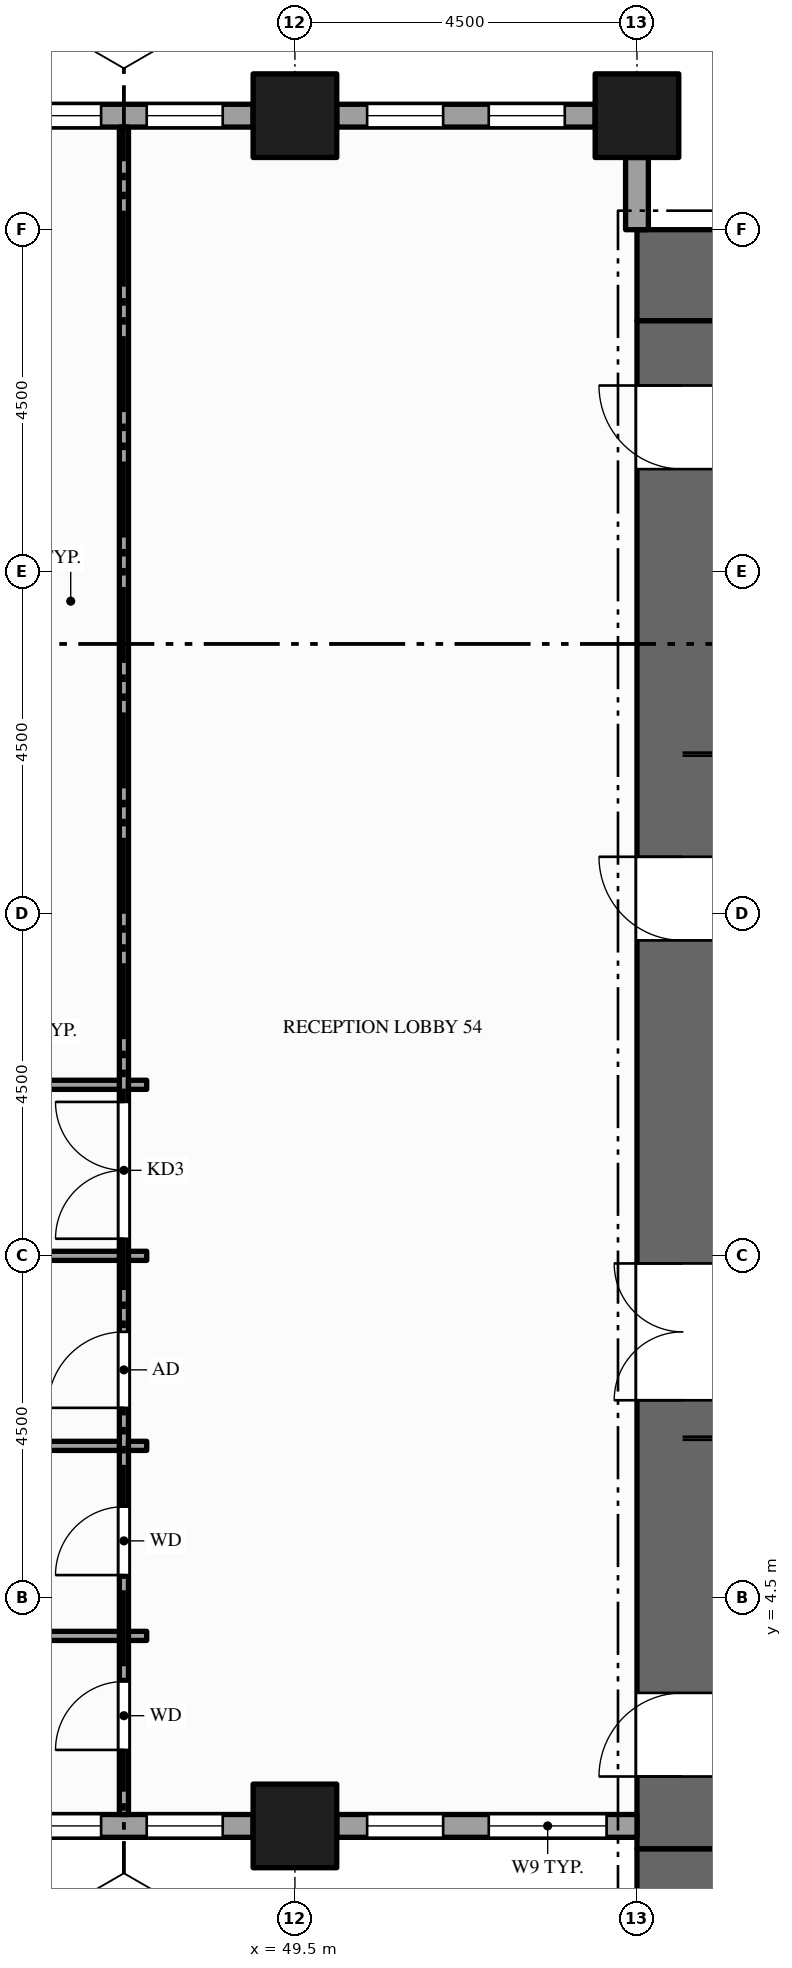
"""IFC4 building model, lengths in metres.
Left out: names, types, materials, properties, quantities, classifications, styles, units other than length and angle.
Written with IfcOpenShell. Run it as: python <this file> out.ifc"""

import sys

from ifc_helpers import new_model, si_unit, direction, frame, frame_2d, origin, origin_2d, place, context, subcontext, project, spatial, rectangle, hollow_rectangle, extrude, element, fill, save


model = new_model("IFC4")
c1 = context("Model", 3, precision=1e-05, world=origin(), true_north=direction((0.0, 1.0)))
c2 = subcontext(c1, "Body", "Model", "MODEL_VIEW")
j1 = project(units=[si_unit("LENGTHUNIT", "METRE"), si_unit("PLANEANGLEUNIT", "RADIAN")], contexts=[c1])
p1 = place(None, origin())
s1 = spatial("IfcSite", under=j1, at=p1, CompositionType="ELEMENT")
p2 = place(p1, origin())
s2 = spatial("IfcBuilding", under=s1, at=p2, CompositionType="ELEMENT")
p3 = place(p2, frame((0.0, 0.0, 69.0)))
s3 = spatial("IfcBuildingStorey", under=s2, at=p3, CompositionType="ELEMENT", Elevation=69.0)
for number, where, z_axis, x_axis in (
    (1, (67.5, 0.6, -0.15), (0.0, 0.0, 1.0), (-1.0, 0.0, 0.0)),
    (2, (54.0, 21.9, -0.15), (0.0, 0.0, 1.0), (1.0, 0.0, 0.0)),
):
    element("IfcWall", number, at=place(p3, frame(where, z_axis=z_axis, x_axis=x_axis)), inside=s3, PredefinedType="SHEAR", context=c2, shape_type="SweptSolid", body=[
        extrude(rectangle(XDim=13.5, YDim=1.2, at=frame_2d((6.75, 0.0))), origin(), (0.0, 0.0, 1.0), 4.0),
    ])
p4 = place(p3, frame((54.6, 1.2, -0.15), z_axis=(0.0, 0.0, 1.0), x_axis=(0.0, 1.0, 0.0)))
e3 = element("IfcWall", 3, at=p4, inside=s3, PredefinedType="SHEAR", context=c2, shape_type="SweptSolid", body=[
    extrude(rectangle(XDim=20.1, YDim=1.2, at=frame_2d((10.05, 0.0))), origin(), (0.0, 0.0, 1.0), 4.0),
])
p5 = place(p4, frame((5.9, 0.0, 0.15)))
e4 = element("IfcOpeningElement", 4, at=p5, cuts=e3, PredefinedType="OPENING", context=c2, shape_type="SweptSolid", body=[
    extrude(rectangle(XDim=1.8, YDim=2.1, at=frame_2d((0.9, 1.05))), frame((0.0, 0.61, 0.0), z_axis=(0.0, -1.0, 0.0), x_axis=(1.0, 0.0, 0.0)), (0.0, 0.0, 1.0), 1.22),
])
p6 = place(p4, frame((11.95, 0.0, 0.15)))
e5 = element("IfcOpeningElement", 5, at=p6, cuts=e3, PredefinedType="OPENING", context=c2, shape_type="SweptSolid", body=[
    extrude(rectangle(XDim=1.1, YDim=2.1, at=frame_2d((0.55, 1.05))), frame((0.0, 0.61, 0.0), z_axis=(0.0, -1.0, 0.0), x_axis=(1.0, 0.0, 0.0)), (0.0, 0.0, 1.0), 1.22),
])
p7 = place(p4, frame((0.95, 0.0, 0.15)))
e6 = element("IfcOpeningElement", 6, at=p7, cuts=e3, PredefinedType="OPENING", context=c2, shape_type="SweptSolid", body=[
    extrude(rectangle(XDim=1.1, YDim=2.1, at=frame_2d((0.55, 1.05))), frame((0.0, 0.61, 0.0), z_axis=(0.0, -1.0, 0.0), x_axis=(1.0, 0.0, 0.0)), (0.0, 0.0, 1.0), 1.22),
])
p8 = place(p4, frame((18.15, 0.0, 0.15)))
e7 = element("IfcOpeningElement", 7, at=p8, cuts=e3, PredefinedType="OPENING", context=c2, shape_type="SweptSolid", body=[
    extrude(rectangle(XDim=1.1, YDim=2.1, at=frame_2d((0.55, 1.05))), frame((0.0, 0.61, 0.0), z_axis=(0.0, -1.0, 0.0), x_axis=(1.0, 0.0, 0.0)), (0.0, 0.0, 1.0), 1.22),
])
for number, where, z_axis, x_axis in (
    (8, (49.5, 1.5, -0.15), (0.0, 0.0, 1.0), (1.0, 0.0, 0.0)),
    (9, (49.5, 24.0, -0.15), (0.0, 0.0, 1.0), (1.0, 0.0, 0.0)),
    (10, (54.0, 24.0, -0.15), (0.0, 0.0, 1.0), (1.0, 0.0, 0.0)),
):
    element("IfcColumn", number, at=place(p3, frame(where, z_axis=z_axis, x_axis=x_axis)), inside=s3, PredefinedType="COLUMN", context=c2, shape_type="SweptSolid", body=[
        extrude(hollow_rectangle(XDim=1.1, YDim=1.1, WallThickness=0.06, at=origin_2d()), origin(), (0.0, 0.0, 1.0), 4.0),
    ])
p9 = place(p3, frame((45.55, 1.5, 0.0), z_axis=(0.0, 0.0, 1.0), x_axis=(1.0, 0.0, 0.0)))
e11 = element("IfcWall", 11, at=p9, inside=s3, PredefinedType="STANDARD", context=c2, shape_type="SweptSolid", body=[
    extrude(rectangle(XDim=3.4, YDim=0.3, at=frame_2d((1.7, 0.0))), origin(), (0.0, 0.0, 1.0), 3.144),
])
p10 = place(p9, frame((0.4, 0.0, 0.9)))
e12 = element("IfcOpeningElement", 12, at=p10, cuts=e11, PredefinedType="OPENING", context=c2, shape_type="SweptSolid", body=[
    extrude(rectangle(XDim=1.0, YDim=2.0, at=frame_2d((0.5, 1.0))), frame((0.0, 0.16, 0.0), z_axis=(0.0, -1.0, 0.0), x_axis=(1.0, 0.0, 0.0)), (0.0, 0.0, 1.0), 0.32),
])
p11 = place(p9, frame((2.0, 0.0, 0.9)))
e13 = element("IfcOpeningElement", 13, at=p11, cuts=e11, PredefinedType="OPENING", context=c2, shape_type="SweptSolid", body=[
    extrude(rectangle(XDim=1.0, YDim=2.0, at=frame_2d((0.5, 1.0))), frame((0.0, 0.16, 0.0), z_axis=(0.0, -1.0, 0.0), x_axis=(1.0, 0.0, 0.0)), (0.0, 0.0, 1.0), 0.32),
])
p12 = place(p3, frame((50.05, 1.5, 0.0), z_axis=(0.0, 0.0, 1.0), x_axis=(1.0, 0.0, 0.0)))
e14 = element("IfcWall", 14, at=p12, inside=s3, PredefinedType="STANDARD", context=c2, shape_type="SweptSolid", body=[
    extrude(rectangle(XDim=3.95, YDim=0.3, at=frame_2d((1.975, 0.0))), origin(), (0.0, 0.0, 1.0), 3.144),
])
p13 = place(p12, frame((0.4, 0.0, 0.9)))
e15 = element("IfcOpeningElement", 15, at=p13, cuts=e14, PredefinedType="OPENING", context=c2, shape_type="SweptSolid", body=[
    extrude(rectangle(XDim=1.0, YDim=2.0, at=frame_2d((0.5, 1.0))), frame((0.0, 0.16, 0.0), z_axis=(0.0, -1.0, 0.0), x_axis=(1.0, 0.0, 0.0)), (0.0, 0.0, 1.0), 0.32),
])
p14 = place(p12, frame((2.0, 0.0, 0.9)))
e16 = element("IfcOpeningElement", 16, at=p14, cuts=e14, PredefinedType="OPENING", context=c2, shape_type="SweptSolid", body=[
    extrude(rectangle(XDim=1.55, YDim=2.0, at=frame_2d((0.775, 1.0))), frame((0.0, 0.16, 0.0), z_axis=(0.0, -1.0, 0.0), x_axis=(1.0, 0.0, 0.0)), (0.0, 0.0, 1.0), 0.32),
])
p15 = place(p3, frame((54.0, 22.5, 0.0), z_axis=(0.0, 0.0, 1.0), x_axis=(0.0, 1.0, 0.0)))
e17 = element("IfcWall", 17, at=p15, inside=s3, PredefinedType="STANDARD", context=c2, shape_type="SweptSolid", body=[
    extrude(rectangle(XDim=0.95, YDim=0.3, at=frame_2d((0.475, 0.0))), origin(), (0.0, 0.0, 1.0), 3.144),
])
p16 = place(p3, frame((53.45, 24.0, 0.0), z_axis=(0.0, 0.0, 1.0), x_axis=(-1.0, 0.0, 0.0)))
e18 = element("IfcWall", 18, at=p16, inside=s3, PredefinedType="STANDARD", context=c2, shape_type="SweptSolid", body=[
    extrude(rectangle(XDim=3.4, YDim=0.3, at=frame_2d((1.7, 0.0))), origin(), (0.0, 0.0, 1.0), 3.144),
])
p17 = place(p16, frame((0.4, 0.0, 0.9)))
e19 = element("IfcOpeningElement", 19, at=p17, cuts=e18, PredefinedType="OPENING", context=c2, shape_type="SweptSolid", body=[
    extrude(rectangle(XDim=1.0, YDim=2.0, at=frame_2d((0.5, 1.0))), frame((0.0, 0.16, 0.0), z_axis=(0.0, -1.0, 0.0), x_axis=(1.0, 0.0, 0.0)), (0.0, 0.0, 1.0), 0.32),
])
p18 = place(p16, frame((2.0, 0.0, 0.9)))
e20 = element("IfcOpeningElement", 20, at=p18, cuts=e18, PredefinedType="OPENING", context=c2, shape_type="SweptSolid", body=[
    extrude(rectangle(XDim=1.0, YDim=2.0, at=frame_2d((0.5, 1.0))), frame((0.0, 0.16, 0.0), z_axis=(0.0, -1.0, 0.0), x_axis=(1.0, 0.0, 0.0)), (0.0, 0.0, 1.0), 0.32),
])
p19 = place(p3, frame((48.95, 24.0, 0.0), z_axis=(0.0, 0.0, 1.0), x_axis=(-1.0, 0.0, 0.0)))
e21 = element("IfcWall", 21, at=p19, inside=s3, PredefinedType="STANDARD", context=c2, shape_type="SweptSolid", body=[
    extrude(rectangle(XDim=3.4, YDim=0.3, at=frame_2d((1.7, 0.0))), origin(), (0.0, 0.0, 1.0), 3.144),
])
p20 = place(p19, frame((0.4, 0.0, 0.9)))
e22 = element("IfcOpeningElement", 22, at=p20, cuts=e21, PredefinedType="OPENING", context=c2, shape_type="SweptSolid", body=[
    extrude(rectangle(XDim=1.0, YDim=2.0, at=frame_2d((0.5, 1.0))), frame((0.0, 0.16, 0.0), z_axis=(0.0, -1.0, 0.0), x_axis=(1.0, 0.0, 0.0)), (0.0, 0.0, 1.0), 0.32),
])
p21 = place(p19, frame((2.0, 0.0, 0.9)))
e23 = element("IfcOpeningElement", 23, at=p21, cuts=e21, PredefinedType="OPENING", context=c2, shape_type="SweptSolid", body=[
    extrude(rectangle(XDim=1.0, YDim=2.0, at=frame_2d((0.5, 1.0))), frame((0.0, 0.16, 0.0), z_axis=(0.0, -1.0, 0.0), x_axis=(1.0, 0.0, 0.0)), (0.0, 0.0, 1.0), 0.32),
])
p22 = place(p3, frame((47.25, 1.65, 0.0), z_axis=(0.0, 0.0, 1.0), x_axis=(0.0, 1.0, 0.0)))
e24 = element("IfcWall", 24, at=p22, inside=s3, PredefinedType="PARTITIONING", context=c2, shape_type="SweptSolid", body=[
    extrude(rectangle(XDim=22.2, YDim=0.12, at=frame_2d((11.1, 0.0))), origin(), (0.0, 0.0, 1.0), 2.938),
])
p23 = place(p22, frame((7.575, 0.0, 0.0)))
e25 = element("IfcOpeningElement", 25, at=p23, cuts=e24, PredefinedType="OPENING", context=c2, shape_type="SweptSolid", body=[
    extrude(rectangle(XDim=1.8, YDim=2.1, at=frame_2d((0.9, 1.05))), frame((0.0, 0.07, 0.0), z_axis=(0.0, -1.0, 0.0), x_axis=(1.0, 0.0, 0.0)), (0.0, 0.0, 1.0), 0.14),
])
p24 = place(p22, frame((0.85, 0.0, 0.0)))
e26 = element("IfcOpeningElement", 26, at=p24, cuts=e24, PredefinedType="OPENING", context=c2, shape_type="SweptSolid", body=[
    extrude(rectangle(XDim=0.9, YDim=2.1, at=frame_2d((0.45, 1.05))), frame((0.0, 0.07, 0.0), z_axis=(0.0, -1.0, 0.0), x_axis=(1.0, 0.0, 0.0)), (0.0, 0.0, 1.0), 0.14),
])
p25 = place(p22, frame((3.15, 0.0, 0.0)))
e27 = element("IfcOpeningElement", 27, at=p25, cuts=e24, PredefinedType="OPENING", context=c2, shape_type="SweptSolid", body=[
    extrude(rectangle(XDim=0.9, YDim=2.1, at=frame_2d((0.45, 1.05))), frame((0.0, 0.07, 0.0), z_axis=(0.0, -1.0, 0.0), x_axis=(1.0, 0.0, 0.0)), (0.0, 0.0, 1.0), 0.14),
])
p26 = place(p22, frame((5.35, 0.0, 0.0)))
e28 = element("IfcOpeningElement", 28, at=p26, cuts=e24, PredefinedType="OPENING", context=c2, shape_type="SweptSolid", body=[
    extrude(rectangle(XDim=1.0, YDim=2.1, at=frame_2d((0.5, 1.05))), frame((0.0, 0.07, 0.0), z_axis=(0.0, -1.0, 0.0), x_axis=(1.0, 0.0, 0.0)), (0.0, 0.0, 1.0), 0.14),
])
p27 = place(p3, frame((42.81, 4.0, 0.0), z_axis=(0.0, 0.0, 1.0), x_axis=(1.0, 0.0, 0.0)))
e29 = element("IfcWall", 29, at=p27, inside=s3, PredefinedType="PARTITIONING", context=c2, shape_type="SweptSolid", body=[
    extrude(rectangle(XDim=4.38, YDim=0.12, at=frame_2d((2.19, 0.0))), origin(), (0.0, 0.0, 1.0), 2.938),
])
p28 = place(p3, frame((47.31, 4.0, 0.0), z_axis=(0.0, 0.0, 1.0), x_axis=(1.0, 0.0, 0.0)))
e30 = element("IfcWall", 30, at=p28, inside=s3, PredefinedType="PARTITIONING", context=c2, shape_type="SweptSolid", body=[
    extrude(rectangle(XDim=0.24, YDim=0.12, at=frame_2d((0.12, 0.0))), origin(), (0.0, 0.0, 1.0), 2.938),
])
p29 = place(p3, frame((42.81, 6.5, 0.0), z_axis=(0.0, 0.0, 1.0), x_axis=(1.0, 0.0, 0.0)))
e31 = element("IfcWall", 31, at=p29, inside=s3, PredefinedType="PARTITIONING", context=c2, shape_type="SweptSolid", body=[
    extrude(rectangle(XDim=4.38, YDim=0.12, at=frame_2d((2.19, 0.0))), origin(), (0.0, 0.0, 1.0), 2.938),
])
p30 = place(p3, frame((47.31, 6.5, 0.0), z_axis=(0.0, 0.0, 1.0), x_axis=(1.0, 0.0, 0.0)))
e32 = element("IfcWall", 32, at=p30, inside=s3, PredefinedType="PARTITIONING", context=c2, shape_type="SweptSolid", body=[
    extrude(rectangle(XDim=0.24, YDim=0.12, at=frame_2d((0.12, 0.0))), origin(), (0.0, 0.0, 1.0), 2.938),
])
p31 = place(p3, frame((42.81, 9.0, 0.0), z_axis=(0.0, 0.0, 1.0), x_axis=(1.0, 0.0, 0.0)))
e33 = element("IfcWall", 33, at=p31, inside=s3, PredefinedType="PARTITIONING", context=c2, shape_type="SweptSolid", body=[
    extrude(rectangle(XDim=4.38, YDim=0.12, at=frame_2d((2.19, 0.0))), origin(), (0.0, 0.0, 1.0), 2.938),
])
p32 = place(p3, frame((47.31, 9.0, 0.0), z_axis=(0.0, 0.0, 1.0), x_axis=(1.0, 0.0, 0.0)))
e34 = element("IfcWall", 34, at=p32, inside=s3, PredefinedType="PARTITIONING", context=c2, shape_type="SweptSolid", body=[
    extrude(rectangle(XDim=0.24, YDim=0.12, at=frame_2d((0.12, 0.0))), origin(), (0.0, 0.0, 1.0), 2.938),
])
p33 = place(p3, frame((40.56, 11.25, 0.0), z_axis=(0.0, 0.0, 1.0), x_axis=(1.0, 0.0, 0.0)))
e35 = element("IfcWall", 35, at=p33, inside=s3, PredefinedType="PARTITIONING", context=c2, shape_type="SweptSolid", body=[
    extrude(rectangle(XDim=6.63, YDim=0.12, at=frame_2d((3.315, 0.0))), origin(), (0.0, 0.0, 1.0), 2.938),
])
p34 = place(p33, frame((2.865, 0.0, 0.0)))
e36 = element("IfcOpeningElement", 36, at=p34, cuts=e35, PredefinedType="OPENING", context=c2, shape_type="SweptSolid", body=[
    extrude(rectangle(XDim=0.9, YDim=2.1, at=frame_2d((0.45, 1.05))), frame((0.0, 0.07, 0.0), z_axis=(0.0, -1.0, 0.0), x_axis=(1.0, 0.0, 0.0)), (0.0, 0.0, 1.0), 0.14),
])
p35 = place(p3, frame((47.31, 11.25, 0.0), z_axis=(0.0, 0.0, 1.0), x_axis=(1.0, 0.0, 0.0)))
e37 = element("IfcWall", 37, at=p35, inside=s3, PredefinedType="PARTITIONING", context=c2, shape_type="SweptSolid", body=[
    extrude(rectangle(XDim=0.24, YDim=0.12, at=frame_2d((0.12, 0.0))), origin(), (0.0, 0.0, 1.0), 2.938),
])
p36 = place(p10, origin())
e38 = element("IfcWindow", 38, at=p36, inside=s3, PartitioningType="SINGLE_PANEL", PredefinedType="WINDOW", context=c2, shape_type="SweptSolid", body=[
    extrude(rectangle(XDim=1.0, YDim=2.0, at=frame_2d((0.5, 1.0))), frame((0.0, 0.03, 0.0), z_axis=(0.0, -1.0, 0.0), x_axis=(1.0, 0.0, 0.0)), (0.0, 0.0, 1.0), 0.06),
])
fill(e12, e38)
p37 = place(p11, origin())
e39 = element("IfcWindow", 39, at=p37, inside=s3, PartitioningType="SINGLE_PANEL", PredefinedType="WINDOW", context=c2, shape_type="SweptSolid", body=[
    extrude(rectangle(XDim=1.0, YDim=2.0, at=frame_2d((0.5, 1.0))), frame((0.0, 0.03, 0.0), z_axis=(0.0, -1.0, 0.0), x_axis=(1.0, 0.0, 0.0)), (0.0, 0.0, 1.0), 0.06),
])
fill(e13, e39)
p38 = place(p13, origin())
e40 = element("IfcWindow", 40, at=p38, inside=s3, PartitioningType="SINGLE_PANEL", PredefinedType="WINDOW", context=c2, shape_type="SweptSolid", body=[
    extrude(rectangle(XDim=1.0, YDim=2.0, at=frame_2d((0.5, 1.0))), frame((0.0, 0.03, 0.0), z_axis=(0.0, -1.0, 0.0), x_axis=(1.0, 0.0, 0.0)), (0.0, 0.0, 1.0), 0.06),
])
fill(e15, e40)
p39 = place(p14, origin())
e41 = element("IfcWindow", 41, at=p39, inside=s3, PartitioningType="SINGLE_PANEL", PredefinedType="WINDOW", context=c2, shape_type="SweptSolid", body=[
    extrude(rectangle(XDim=1.55, YDim=2.0, at=frame_2d((0.775, 1.0))), frame((0.0, 0.03, 0.0), z_axis=(0.0, -1.0, 0.0), x_axis=(1.0, 0.0, 0.0)), (0.0, 0.0, 1.0), 0.06),
])
fill(e16, e41)
p40 = place(p17, origin())
e42 = element("IfcWindow", 42, at=p40, inside=s3, PartitioningType="SINGLE_PANEL", PredefinedType="WINDOW", context=c2, shape_type="SweptSolid", body=[
    extrude(rectangle(XDim=1.0, YDim=2.0, at=frame_2d((0.5, 1.0))), frame((0.0, 0.03, 0.0), z_axis=(0.0, -1.0, 0.0), x_axis=(1.0, 0.0, 0.0)), (0.0, 0.0, 1.0), 0.06),
])
fill(e19, e42)
p41 = place(p18, origin())
e43 = element("IfcWindow", 43, at=p41, inside=s3, PartitioningType="SINGLE_PANEL", PredefinedType="WINDOW", context=c2, shape_type="SweptSolid", body=[
    extrude(rectangle(XDim=1.0, YDim=2.0, at=frame_2d((0.5, 1.0))), frame((0.0, 0.03, 0.0), z_axis=(0.0, -1.0, 0.0), x_axis=(1.0, 0.0, 0.0)), (0.0, 0.0, 1.0), 0.06),
])
fill(e20, e43)
p42 = place(p20, origin())
e44 = element("IfcWindow", 44, at=p42, inside=s3, PartitioningType="SINGLE_PANEL", PredefinedType="WINDOW", context=c2, shape_type="SweptSolid", body=[
    extrude(rectangle(XDim=1.0, YDim=2.0, at=frame_2d((0.5, 1.0))), frame((0.0, 0.03, 0.0), z_axis=(0.0, -1.0, 0.0), x_axis=(1.0, 0.0, 0.0)), (0.0, 0.0, 1.0), 0.06),
])
fill(e22, e44)
p43 = place(p21, origin())
e45 = element("IfcWindow", 45, at=p43, inside=s3, PartitioningType="SINGLE_PANEL", PredefinedType="WINDOW", context=c2, shape_type="SweptSolid", body=[
    extrude(rectangle(XDim=1.0, YDim=2.0, at=frame_2d((0.5, 1.0))), frame((0.0, 0.03, 0.0), z_axis=(0.0, -1.0, 0.0), x_axis=(1.0, 0.0, 0.0)), (0.0, 0.0, 1.0), 0.06),
])
fill(e23, e45)
p44 = place(p5, origin())
e46 = element("IfcDoor", 46, at=p44, inside=s3, OperationType="DOUBLE_DOOR_SINGLE_SWING", PredefinedType="DOOR", context=c2, shape_type="SweptSolid", body=[
    extrude(rectangle(XDim=1.8, YDim=2.1, at=frame_2d((0.9, 1.05))), frame((0.0, 0.025, 0.0), z_axis=(0.0, -1.0, 0.0), x_axis=(1.0, 0.0, 0.0)), (0.0, 0.0, 1.0), 0.05),
])
fill(e4, e46)
p45 = place(p6, origin())
e47 = element("IfcDoor", 47, at=p45, inside=s3, OperationType="SINGLE_SWING_RIGHT", PredefinedType="DOOR", context=c2, shape_type="SweptSolid", body=[
    extrude(rectangle(XDim=1.1, YDim=2.1, at=frame_2d((0.55, 1.05))), frame((0.0, 0.025, 0.0), z_axis=(0.0, -1.0, 0.0), x_axis=(1.0, 0.0, 0.0)), (0.0, 0.0, 1.0), 0.05),
])
fill(e5, e47)
p46 = place(p7, origin())
e48 = element("IfcDoor", 48, at=p46, inside=s3, OperationType="SINGLE_SWING_LEFT", PredefinedType="DOOR", context=c2, shape_type="SweptSolid", body=[
    extrude(rectangle(XDim=1.1, YDim=2.1, at=frame_2d((0.55, 1.05))), frame((0.0, 0.025, 0.0), z_axis=(0.0, -1.0, 0.0), x_axis=(1.0, 0.0, 0.0)), (0.0, 0.0, 1.0), 0.05),
])
fill(e6, e48)
p47 = place(p8, origin())
e49 = element("IfcDoor", 49, at=p47, inside=s3, OperationType="SINGLE_SWING_RIGHT", PredefinedType="DOOR", context=c2, shape_type="SweptSolid", body=[
    extrude(rectangle(XDim=1.1, YDim=2.1, at=frame_2d((0.55, 1.05))), frame((0.0, 0.025, 0.0), z_axis=(0.0, -1.0, 0.0), x_axis=(1.0, 0.0, 0.0)), (0.0, 0.0, 1.0), 0.05),
])
fill(e7, e49)
p48 = place(p23, origin())
e50 = element("IfcDoor", 50, at=p48, inside=s3, OperationType="DOUBLE_DOOR_SINGLE_SWING", PredefinedType="DOOR", context=c2, shape_type="SweptSolid", body=[
    extrude(rectangle(XDim=1.8, YDim=2.1, at=frame_2d((0.9, 1.05))), frame((0.0, 0.025, 0.0), z_axis=(0.0, -1.0, 0.0), x_axis=(1.0, 0.0, 0.0)), (0.0, 0.0, 1.0), 0.05),
])
fill(e25, e50)
p49 = place(p24, origin())
e51 = element("IfcDoor", 51, at=p49, inside=s3, OperationType="SINGLE_SWING_LEFT", PredefinedType="DOOR", context=c2, shape_type="SweptSolid", body=[
    extrude(rectangle(XDim=0.9, YDim=2.1, at=frame_2d((0.45, 1.05))), frame((0.0, 0.025, 0.0), z_axis=(0.0, -1.0, 0.0), x_axis=(1.0, 0.0, 0.0)), (0.0, 0.0, 1.0), 0.05),
])
fill(e26, e51)
p50 = place(p25, origin())
e52 = element("IfcDoor", 52, at=p50, inside=s3, OperationType="SINGLE_SWING_LEFT", PredefinedType="DOOR", context=c2, shape_type="SweptSolid", body=[
    extrude(rectangle(XDim=0.9, YDim=2.1, at=frame_2d((0.45, 1.05))), frame((0.0, 0.025, 0.0), z_axis=(0.0, -1.0, 0.0), x_axis=(1.0, 0.0, 0.0)), (0.0, 0.0, 1.0), 0.05),
])
fill(e27, e52)
p51 = place(p26, origin())
e53 = element("IfcDoor", 53, at=p51, inside=s3, OperationType="SINGLE_SWING_LEFT", PredefinedType="DOOR", context=c2, shape_type="SweptSolid", body=[
    extrude(rectangle(XDim=1.0, YDim=2.1, at=frame_2d((0.5, 1.05))), frame((0.0, 0.025, 0.0), z_axis=(0.0, -1.0, 0.0), x_axis=(1.0, 0.0, 0.0)), (0.0, 0.0, 1.0), 0.05),
])
fill(e28, e53)
save(model, sys.argv[1])
